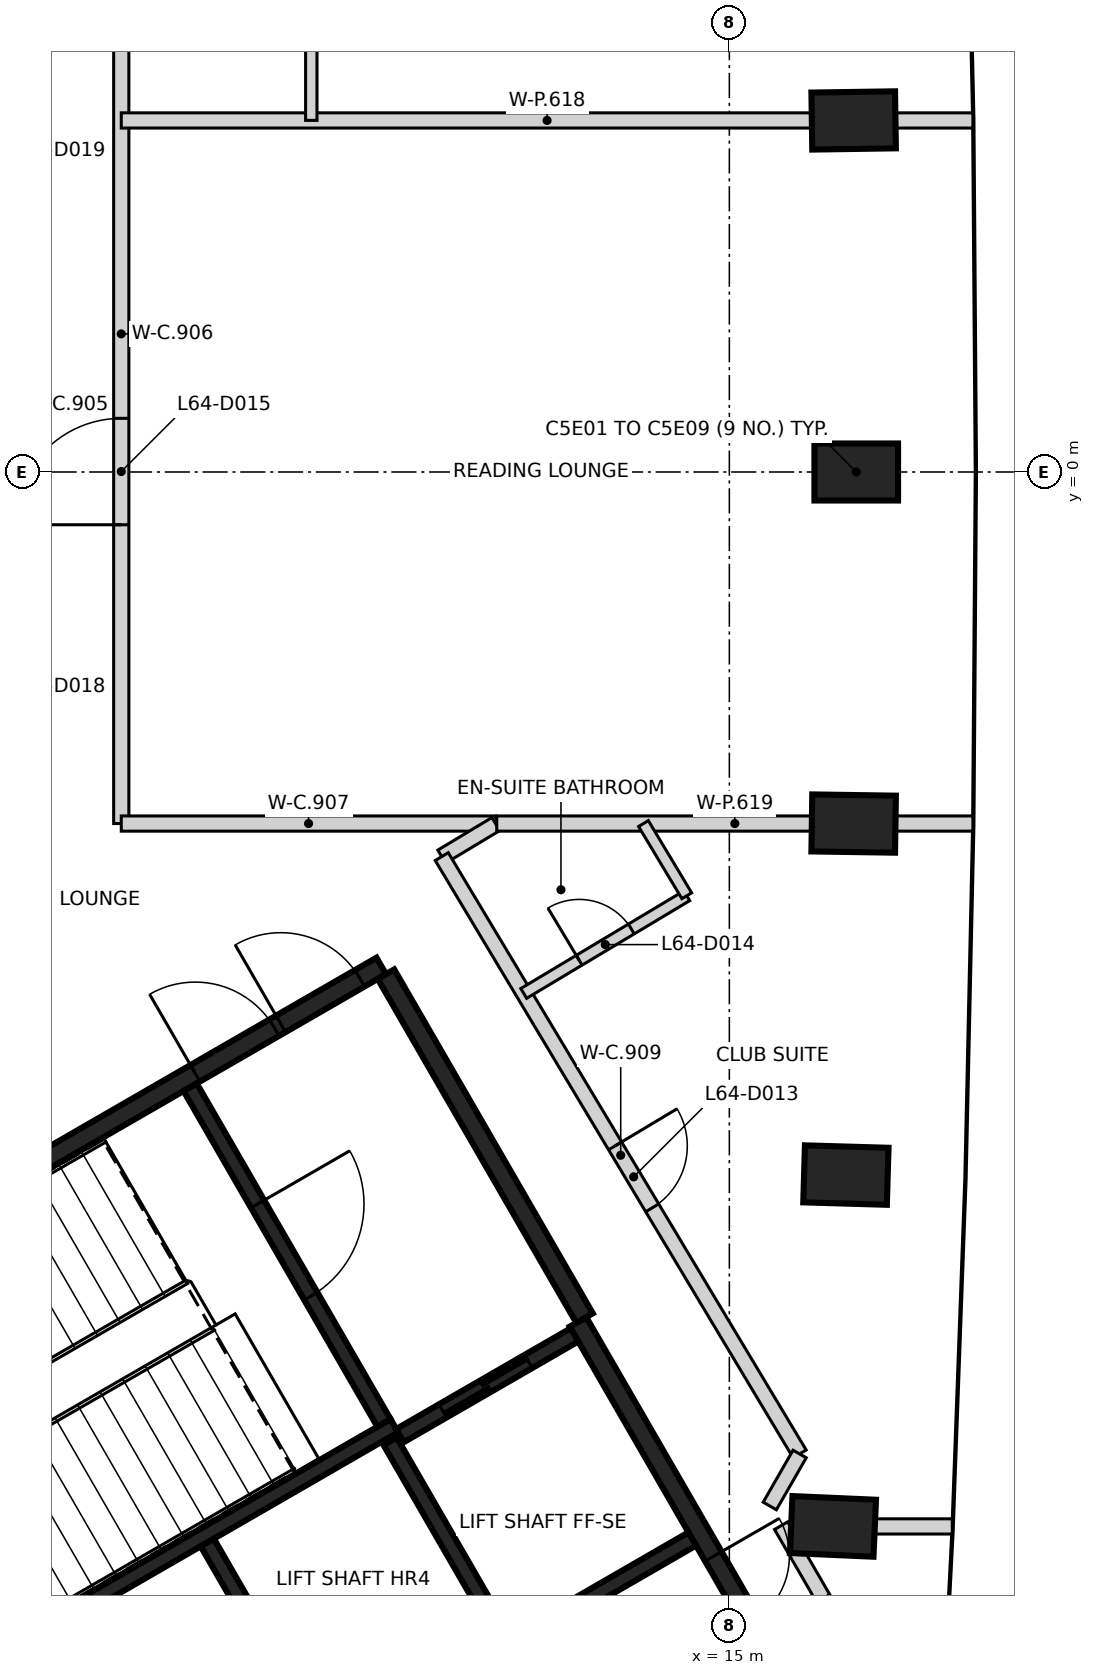
"""IFC4 building model, lengths in metres.
Left out: names, types, materials, properties, quantities, classifications, styles, units other than length and angle.
Written with IfcOpenShell. Run it as: python <this file> out.ifc"""

import sys

from ifc_helpers import new_model, si_unit, direction, frame, frame_2d, origin, origin_2d, place, context, subcontext, project, spatial, rectangle, extrude, element, fill, save


model = new_model("IFC4")
c1 = context("Model", 3, precision=1e-05, world=origin(), true_north=direction((0.0, 1.0)))
c2 = subcontext(c1, "Body", "Model", "MODEL_VIEW")
j1 = project(units=[si_unit("LENGTHUNIT", "METRE"), si_unit("PLANEANGLEUNIT", "RADIAN")], contexts=[c1])
p1 = place(None, origin())
s1 = spatial("IfcSite", under=j1, at=p1, CompositionType="ELEMENT")
p2 = place(p1, origin())
s2 = spatial("IfcBuilding", under=s1, at=p2, CompositionType="ELEMENT")
p3 = place(p2, frame((0.0, 0.0, 253.8)))
s3 = spatial("IfcBuildingStorey", under=s2, at=p3, CompositionType="ELEMENT", Elevation=253.8)
for number, where, z_axis, x_axis in (
    (1, (16.363, -13.872, -0.35), (0.0, 0.0, 1.0), (-0.999, 0.044, 0.0)),
    (2, (16.533, -9.25, -0.35), (0.0, 0.0, 1.0), (-1.0, 0.029, 0.0)),
    (3, (16.635, -4.625, -0.35), (0.0, 0.0, 1.0), (-1.0, 0.015, 0.0)),
    (4, (16.669, 0.0, -0.35), (0.0, 0.0, 1.0), (1.0, 0.0, 0.0)),
    (5, (16.635, 4.625, -0.35), (0.0, 0.0, 1.0), (1.0, 0.015, 0.0)),
):
    element("IfcColumn", number, at=place(p3, frame(where, z_axis=z_axis, x_axis=x_axis)), inside=s3, PredefinedType="COLUMN", context=c2, shape_type="SweptSolid", body=[
        extrude(rectangle(XDim=1.1, YDim=0.75, at=origin_2d()), origin(), (0.0, 0.0, 1.0), 2.64),
    ])
p4 = place(p3, frame((0.417, -12.273, 0.0), z_axis=(0.0, 0.0, 1.0), x_axis=(0.866021906294, 0.500006057782, 0.0)))
e6 = element("IfcWall", 6, at=p4, inside=s3, PredefinedType="SHEAR", context=c2, shape_type="SweptSolid", body=[
    extrude(rectangle(XDim=11.55, YDim=0.25, at=frame_2d((5.775, 0.0))), origin(), (0.0, 0.0, 1.0), 3.2),
])
p5 = place(p4, frame((10.025, 0.0, 0.0)))
e7 = element("IfcOpeningElement", 7, at=p5, cuts=e6, PredefinedType="OPENING", context=c2, shape_type="SweptSolid", body=[
    extrude(rectangle(XDim=1.2, YDim=2.1, at=frame_2d((0.6, 1.05))), frame((0.0, 0.135, 0.0), z_axis=(0.0, -1.0, 0.0), x_axis=(1.0, 0.0, 0.0)), (0.0, 0.0, 1.0), 0.27),
])
p6 = place(p4, frame((8.725, 0.0, 0.0)))
e8 = element("IfcOpeningElement", 8, at=p6, cuts=e6, PredefinedType="OPENING", context=c2, shape_type="SweptSolid", body=[
    extrude(rectangle(XDim=1.2, YDim=2.1, at=frame_2d((0.6, 1.05))), frame((0.0, 0.135, 0.0), z_axis=(0.0, -1.0, 0.0), x_axis=(1.0, 0.0, 0.0)), (0.0, 0.0, 1.0), 0.27),
])
p7 = place(p3, frame((13.008, -11.181, 0.0), z_axis=(0.0, 0.0, 1.0), x_axis=(0.500001955336, -0.866024274868, 0.0)))
e9 = element("IfcWall", 9, at=p7, inside=s3, PredefinedType="SHEAR", context=c2, shape_type="SweptSolid", body=[
    extrude(rectangle(XDim=6.125, YDim=0.25, at=frame_2d((3.062, 0.0))), origin(), (0.0, 0.0, 1.0), 3.2),
])
p8 = place(p7, frame((3.563, 0.0, 0.0)))
e10 = element("IfcOpeningElement", 10, at=p8, cuts=e9, PredefinedType="OPENING", context=c2, shape_type="SweptSolid", body=[
    extrude(rectangle(XDim=1.0, YDim=2.1, at=frame_2d((0.5, 1.05))), frame((0.0, 0.135, 0.0), z_axis=(0.0, -1.0, 0.0), x_axis=(1.0, 0.0, 0.0)), (0.0, 0.0, 1.0), 0.27),
])
p9 = place(p3, frame((10.483, -6.606, 0.0), z_axis=(0.0, 0.0, 1.0), x_axis=(0.49999885962, -0.866026062182, 0.0)))
e11 = element("IfcWall", 11, at=p9, inside=s3, PredefinedType="SHEAR", context=c2, shape_type="SweptSolid", body=[
    extrude(rectangle(XDim=5.225, YDim=0.25, at=frame_2d((2.612, 0.0))), origin(), (0.0, 0.0, 1.0), 3.2),
])
p10 = place(p3, frame((5.419, -15.534, 0.0), z_axis=(0.0, 0.0, 1.0), x_axis=(0.866029065029, 0.499993658486, 0.0)))
e12 = element("IfcWall", 12, at=p10, inside=s3, PredefinedType="SHEAR", context=c2, shape_type="SweptSolid", body=[
    extrude(rectangle(XDim=5.974, YDim=0.2, at=frame_2d((2.987, 0.0))), origin(), (0.0, 0.0, 1.0), 3.2),
])
p11 = place(p3, frame((7.906, -8.094, 0.0), z_axis=(0.0, 0.0, 1.0), x_axis=(0.500027839223, -0.866009330205, 0.0)))
e13 = element("IfcWall", 13, at=p11, inside=s3, PredefinedType="SHEAR", context=c2, shape_type="SweptSolid", body=[
    extrude(rectangle(XDim=5.098, YDim=0.2, at=frame_2d((2.549, 0.0))), origin(), (0.0, 0.0, 1.0), 3.2),
])
p12 = place(p11, frame((1.774, 0.0, 0.0)))
e14 = element("IfcOpeningElement", 14, at=p12, cuts=e13, PredefinedType="OPENING", context=c2, shape_type="SweptSolid", body=[
    extrude(rectangle(XDim=1.4, YDim=2.1, at=frame_2d((0.7, 1.05))), frame((0.0, 0.11, 0.0), z_axis=(0.0, -1.0, 0.0), x_axis=(1.0, 0.0, 0.0)), (0.0, 0.0, 1.0), 0.22),
])
p13 = place(p3, frame((8.132, -14.084, 0.0), z_axis=(0.0, 0.0, 1.0), x_axis=(0.499997778408, -0.866026686418, 0.0)))
e15 = element("IfcWall", 15, at=p13, inside=s3, PredefinedType="SHEAR", context=c2, shape_type="SweptSolid", body=[
    extrude(rectangle(XDim=3.198, YDim=0.2, at=frame_2d((1.599, 0.0))), origin(), (0.0, 0.0, 1.0), 3.2),
])
p14 = place(p3, frame((12.088, -15.437, 0.0), z_axis=(0.0, 0.0, 1.0), x_axis=(-0.500026960575, 0.86600983753, 0.0)))
e16 = element("IfcWall", 16, at=p14, inside=s3, PredefinedType="SHEAR", context=c2, shape_type="SweptSolid", body=[
    extrude(rectangle(XDim=3.1, YDim=0.2, at=frame_2d((1.55, 0.0))), origin(), (0.0, 0.0, 1.0), 3.2),
])
p15 = place(p3, frame((10.666, -12.678, 0.0), z_axis=(0.0, 0.0, 1.0), x_axis=(0.866018407898, 0.500012117035, 0.0)))
e17 = element("IfcWall", 17, at=p15, inside=s3, PredefinedType="SHEAR", context=c2, shape_type="SweptSolid", body=[
    extrude(rectangle(XDim=2.651, YDim=0.2, at=frame_2d((1.325, 0.0))), origin(), (0.0, 0.0, 1.0), 3.2),
])
p16 = place(p15, frame((0.652, 0.0, 0.0)))
e18 = element("IfcOpeningElement", 18, at=p16, cuts=e17, PredefinedType="OPENING", context=c2, shape_type="SweptSolid", body=[
    extrude(rectangle(XDim=1.3, YDim=2.1, at=frame_2d((0.65, 1.05))), frame((0.0, 0.11, 0.0), z_axis=(0.0, -1.0, 0.0), x_axis=(1.0, 0.0, 0.0)), (0.0, 0.0, 1.0), 0.22),
])
p17 = place(p3, frame((14.512, -14.037, 0.0), z_axis=(0.0, 0.0, 1.0), x_axis=(-0.866018407898, -0.500012117035, 0.0)))
e19 = element("IfcWall", 19, at=p17, inside=s3, PredefinedType="SHEAR", context=c2, shape_type="SweptSolid", body=[
    extrude(rectangle(XDim=2.651, YDim=0.2, at=frame_2d((1.325, 0.0))), origin(), (0.0, 0.0, 1.0), 3.2),
])
p18 = place(p3, frame((7.0, -4.625, 0.0), z_axis=(0.0, 0.0, 1.0), x_axis=(0.0, 1.0, 0.0)))
e20 = element("IfcWall", 20, at=p18, inside=s3, PredefinedType="PARTITIONING", context=c2, shape_type="SweptSolid", body=[
    extrude(rectangle(XDim=12.884, YDim=0.2, at=frame_2d((6.442, 0.0))), origin(), (0.0, 0.0, 1.0), 3.2),
])
p19 = place(p18, frame((3.931, 0.0, 0.0)))
e21 = element("IfcOpeningElement", 21, at=p19, cuts=e20, PredefinedType="OPENING", context=c2, shape_type="SweptSolid", body=[
    extrude(rectangle(XDim=1.4, YDim=2.1, at=frame_2d((0.7, 1.05))), frame((0.0, 0.11, 0.0), z_axis=(0.0, -1.0, 0.0), x_axis=(1.0, 0.0, 0.0)), (0.0, 0.0, 1.0), 0.22),
])
p20 = place(p18, frame((11.777, 0.0, 0.0)))
e22 = element("IfcOpeningElement", 22, at=p20, cuts=e20, PredefinedType="OPENING", context=c2, shape_type="SweptSolid", body=[
    extrude(rectangle(XDim=0.95, YDim=2.1, at=frame_2d((0.475, 1.05))), frame((0.0, 0.11, 0.0), z_axis=(0.0, -1.0, 0.0), x_axis=(1.0, 0.0, 0.0)), (0.0, 0.0, 1.0), 0.22),
])
p21 = place(p3, frame((7.0, -4.625, 0.0), z_axis=(0.0, 0.0, 1.0), x_axis=(1.0, 0.0, 0.0)))
e23 = element("IfcWall", 23, at=p21, inside=s3, PredefinedType="PARTITIONING", context=c2, shape_type="SweptSolid", body=[
    extrude(rectangle(XDim=4.928, YDim=0.2, at=frame_2d((2.464, 0.0))), origin(), (0.0, 0.0, 1.0), 3.2),
])
p22 = place(p3, frame((11.216, -5.06, 0.0), z_axis=(0.0, 0.0, 1.0), x_axis=(0.857051740658, 0.515230350265, 0.0)))
e24 = element("IfcWall", 24, at=p22, inside=s3, PredefinedType="PARTITIONING", context=c2, shape_type="SweptSolid", body=[
    extrude(rectangle(XDim=0.831, YDim=0.2, at=frame_2d((0.415, 0.0))), origin(), (0.0, 0.0, 1.0), 3.2),
])
p23 = place(p3, frame((11.216, -5.06, 0.0), z_axis=(0.0, 0.0, 1.0), x_axis=(0.514001858113, -0.857789070726, 0.0)))
e25 = element("IfcWall", 25, at=p23, inside=s3, PredefinedType="PARTITIONING", context=c2, shape_type="SweptSolid", body=[
    extrude(rectangle(XDim=9.161, YDim=0.2, at=frame_2d((4.581, 0.0))), origin(), (0.0, 0.0, 1.0), 3.2),
])
p24 = place(p23, frame((4.437, 0.0, 0.0)))
e26 = element("IfcOpeningElement", 26, at=p24, cuts=e25, PredefinedType="OPENING", context=c2, shape_type="SweptSolid", body=[
    extrude(rectangle(XDim=0.95, YDim=2.1, at=frame_2d((0.475, 1.05))), frame((0.0, 0.11, 0.0), z_axis=(0.0, -1.0, 0.0), x_axis=(1.0, 0.0, 0.0)), (0.0, 0.0, 1.0), 0.22),
])
p25 = place(p3, frame((15.55, -15.213, 0.0), z_axis=(0.0, 0.0, 1.0), x_axis=(0.865989998118, 0.500061319399, 0.0)))
e27 = element("IfcWall", 27, at=p25, inside=s3, PredefinedType="PARTITIONING", context=c2, shape_type="SweptSolid", body=[
    extrude(rectangle(XDim=0.79, YDim=0.2, at=frame_2d((0.395, 0.0))), origin(), (0.0, 0.0, 1.0), 3.2),
])
p26 = place(p3, frame((15.532, -13.603, 0.0), z_axis=(0.0, 0.0, 1.0), x_axis=(0.498203662485, 0.867060038686, 0.0)))
e28 = element("IfcWall", 28, at=p26, inside=s3, PredefinedType="PARTITIONING", context=c2, shape_type="SweptSolid", body=[
    extrude(rectangle(XDim=0.789, YDim=0.2, at=frame_2d((0.395, 0.0))), origin(), (0.0, 0.0, 1.0), 3.2),
])
p27 = place(p3, frame((15.681, -13.862, 0.0), z_axis=(0.0, 0.0, 1.0), x_axis=(0.500678970179, -0.86563304513, 0.0)))
e29 = element("IfcWall", 29, at=p27, inside=s3, PredefinedType="PARTITIONING", context=c2, shape_type="SweptSolid", body=[
    extrude(rectangle(XDim=1.104, YDim=0.2, at=frame_2d((0.552, 0.0))), origin(), (0.0, 0.0, 1.0), 3.2),
])
p28 = place(p3, frame((7.0, 4.625, 0.0), z_axis=(0.0, 0.0, 1.0), x_axis=(1.0, 0.0, 0.0)))
e30 = element("IfcWall", 30, at=p28, inside=s3, PredefinedType="PARTITIONING", context=c2, shape_type="SweptSolid", body=[
    extrude(rectangle(XDim=11.204, YDim=0.2, at=frame_2d((5.602, 0.0))), origin(), (0.0, 0.0, 1.0), 3.2),
])
p29 = place(p3, frame((11.94, -4.625, 0.0), z_axis=(0.0, 0.0, 1.0), x_axis=(1.0, 0.0, 0.0)))
e31 = element("IfcWall", 31, at=p29, inside=s3, PredefinedType="PARTITIONING", context=c2, shape_type="SweptSolid", body=[
    extrude(rectangle(XDim=6.264, YDim=0.2, at=frame_2d((3.132, 0.0))), origin(), (0.0, 0.0, 1.0), 3.2),
])
p30 = place(p3, frame((17.933, -13.872, 0.0), z_axis=(0.0, 0.0, 1.0), x_axis=(-1.0, 0.0, 0.0)))
e32 = element("IfcWall", 32, at=p30, inside=s3, PredefinedType="PARTITIONING", context=c2, shape_type="SweptSolid", body=[
    extrude(rectangle(XDim=1.899, YDim=0.2, at=frame_2d((0.95, 0.0))), origin(), (0.0, 0.0, 1.0), 3.2),
])
p31 = place(p3, frame((9.5, 4.626, 0.0), z_axis=(0.0, 0.0, 1.0), x_axis=(0.0, 1.0, 0.0)))
e33 = element("IfcWall", 33, at=p31, inside=s3, PredefinedType="PARTITIONING", context=c2, shape_type="SweptSolid", body=[
    extrude(rectangle(XDim=2.097, YDim=0.15, at=frame_2d((1.048, 0.0))), origin(), (0.0, 0.0, 1.0), 3.2),
])
p32 = place(p3, frame((12.295, -6.86, 0.0), z_axis=(0.0, 0.0, 1.0), x_axis=(0.857820116165, 0.513950044559, 0.0)))
e34 = element("IfcWall", 34, at=p32, inside=s3, PredefinedType="PARTITIONING", context=c2, shape_type="SweptSolid", body=[
    extrude(rectangle(XDim=2.5, YDim=0.15, at=frame_2d((1.25, 0.0))), origin(), (0.0, 0.0, 1.0), 3.2),
])
p33 = place(p32, frame((0.85, 0.0, 0.0)))
e35 = element("IfcOpeningElement", 35, at=p33, cuts=e34, PredefinedType="OPENING", context=c2, shape_type="SweptSolid", body=[
    extrude(rectangle(XDim=0.8, YDim=2.1, at=frame_2d((0.4, 1.05))), frame((0.0, 0.085, 0.0), z_axis=(0.0, -1.0, 0.0), x_axis=(1.0, 0.0, 0.0)), (0.0, 0.0, 1.0), 0.17),
])
p34 = place(p3, frame((13.87, -4.625, 0.0), z_axis=(0.0, 0.0, 1.0), x_axis=(0.514398519676, -0.857551259666, 0.0)))
e36 = element("IfcWall", 36, at=p34, inside=s3, PredefinedType="PARTITIONING", context=c2, shape_type="SweptSolid", body=[
    extrude(rectangle(XDim=1.108, YDim=0.15, at=frame_2d((0.554, 0.0))), origin(), (0.0, 0.0, 1.0), 3.2),
])
p35 = place(p16, origin())
e37 = element("IfcDoor", 37, at=p35, inside=s3, OperationType="SLIDING_TO_RIGHT", PredefinedType="DOOR", context=c2, shape_type="SweptSolid", body=[
    extrude(rectangle(XDim=1.3, YDim=2.1, at=frame_2d((0.65, 1.05))), frame((0.0, 0.025, 0.0), z_axis=(0.0, -1.0, 0.0), x_axis=(1.0, 0.0, 0.0)), (0.0, 0.0, 1.0), 0.05),
])
fill(e18, e37)
p36 = place(p8, origin())
e38 = element("IfcDoor", 38, at=p36, inside=s3, OperationType="SINGLE_SWING_LEFT", PredefinedType="DOOR", context=c2, shape_type="SweptSolid", body=[
    extrude(rectangle(XDim=1.0, YDim=2.1, at=frame_2d((0.5, 1.05))), frame((0.0, 0.025, 0.0), z_axis=(0.0, -1.0, 0.0), x_axis=(1.0, 0.0, 0.0)), (0.0, 0.0, 1.0), 0.05),
])
fill(e10, e38)
p37 = place(p5, origin())
e39 = element("IfcDoor", 39, at=p37, inside=s3, OperationType="SINGLE_SWING_LEFT", PredefinedType="DOOR", context=c2, shape_type="SweptSolid", body=[
    extrude(rectangle(XDim=1.2, YDim=2.1, at=frame_2d((0.6, 1.05))), frame((0.0, 0.025, 0.0), z_axis=(0.0, -1.0, 0.0), x_axis=(1.0, 0.0, 0.0)), (0.0, 0.0, 1.0), 0.05),
])
fill(e7, e39)
p38 = place(p6, origin())
e40 = element("IfcDoor", 40, at=p38, inside=s3, OperationType="SINGLE_SWING_RIGHT", PredefinedType="DOOR", context=c2, shape_type="SweptSolid", body=[
    extrude(rectangle(XDim=1.2, YDim=2.1, at=frame_2d((0.6, 1.05))), frame((0.0, 0.025, 0.0), z_axis=(0.0, -1.0, 0.0), x_axis=(1.0, 0.0, 0.0)), (0.0, 0.0, 1.0), 0.05),
])
fill(e8, e40)
p39 = place(p12, origin())
e41 = element("IfcDoor", 41, at=p39, inside=s3, OperationType="SINGLE_SWING_RIGHT", PredefinedType="DOOR", context=c2, shape_type="SweptSolid", body=[
    extrude(rectangle(XDim=1.4, YDim=2.1, at=frame_2d((0.7, 1.05))), frame((0.0, 0.025, 0.0), z_axis=(0.0, -1.0, 0.0), x_axis=(1.0, 0.0, 0.0)), (0.0, 0.0, 1.0), 0.05),
])
fill(e14, e41)
p40 = place(p24, origin())
e42 = element("IfcDoor", 42, at=p40, inside=s3, OperationType="SINGLE_SWING_LEFT", PredefinedType="DOOR", context=c2, shape_type="SweptSolid", body=[
    extrude(rectangle(XDim=0.95, YDim=2.1, at=frame_2d((0.475, 1.05))), frame((0.0, 0.025, 0.0), z_axis=(0.0, -1.0, 0.0), x_axis=(1.0, 0.0, 0.0)), (0.0, 0.0, 1.0), 0.05),
])
fill(e26, e42)
p41 = place(p33, frame((0.8, 0.0, 0.0), z_axis=(0.0, 0.0, 1.0), x_axis=(-1.0, 0.0, 0.0)))
e43 = element("IfcDoor", 43, at=p41, inside=s3, OperationType="SINGLE_SWING_LEFT", PredefinedType="DOOR", context=c2, shape_type="SweptSolid", body=[
    extrude(rectangle(XDim=0.8, YDim=2.1, at=frame_2d((0.4, 1.05))), frame((0.0, 0.025, 0.0), z_axis=(0.0, -1.0, 0.0), x_axis=(1.0, 0.0, 0.0)), (0.0, 0.0, 1.0), 0.05),
])
fill(e35, e43)
p42 = place(p19, frame((1.4, 0.0, 0.0), z_axis=(0.0, 0.0, 1.0), x_axis=(-1.0, 0.0, 0.0)))
e44 = element("IfcDoor", 44, at=p42, inside=s3, OperationType="DOUBLE_DOOR_SINGLE_SWING", PredefinedType="DOOR", context=c2, shape_type="SweptSolid", body=[
    extrude(rectangle(XDim=1.4, YDim=2.1, at=frame_2d((0.7, 1.05))), frame((0.0, 0.025, 0.0), z_axis=(0.0, -1.0, 0.0), x_axis=(1.0, 0.0, 0.0)), (0.0, 0.0, 1.0), 0.05),
])
fill(e21, e44)
save(model, sys.argv[1])
